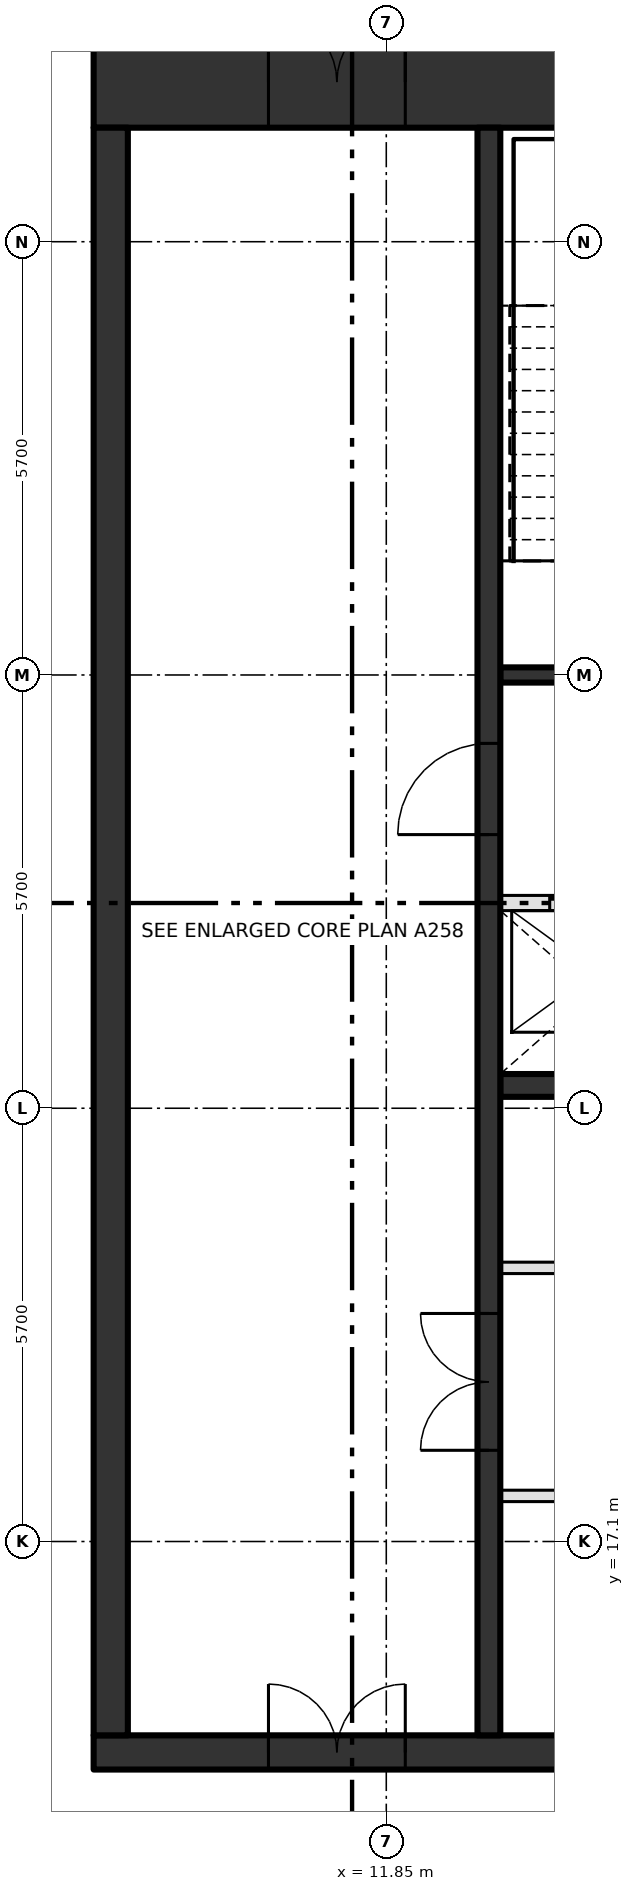
"""IFC4 building model, lengths in metres.
Left out: names, types, materials, properties, quantities, classifications, styles, units other than length and angle.
Written with IfcOpenShell. Run it as: python <this file> out.ifc"""

import sys

from ifc_helpers import new_model, si_unit, direction, frame, frame_2d, origin, place, context, subcontext, project, spatial, rectangle, extrude, element, fill, save


model = new_model("IFC4")
c1 = context("Model", 3, precision=1e-05, world=origin(), true_north=direction((0.0, 1.0)))
c2 = subcontext(c1, "Body", "Model", "MODEL_VIEW")
j1 = project(units=[si_unit("LENGTHUNIT", "METRE"), si_unit("PLANEANGLEUNIT", "RADIAN")], contexts=[c1])
p1 = place(None, origin())
s1 = spatial("IfcSite", under=j1, at=p1, CompositionType="ELEMENT")
p2 = place(p1, origin())
s2 = spatial("IfcBuilding", under=s1, at=p2, CompositionType="ELEMENT")
p3 = place(p2, frame((0.0, 0.0, 419.4)))
s3 = spatial("IfcBuildingStorey", under=s2, at=p3, CompositionType="ELEMENT", Elevation=419.4)
p4 = place(p3, frame((8.0, 14.325, -0.45), z_axis=(0.0, 0.0, 1.0), x_axis=(1.0, 0.0, 0.0)))
e1 = element("IfcWall", 1, at=p4, inside=s3, PredefinedType="SHEAR", context=c2, shape_type="SweptSolid", body=[
    extrude(rectangle(XDim=22.8, YDim=0.45, at=frame_2d((11.4, 0.0))), origin(), (0.0, 0.0, 1.0), 4.95),
])
p5 = place(p4, frame((2.3, 0.0, 0.45)))
e2 = element("IfcOpeningElement", 2, at=p5, cuts=e1, PredefinedType="OPENING", context=c2, shape_type="SweptSolid", body=[
    extrude(rectangle(XDim=1.8, YDim=2.1, at=frame_2d((0.9, 1.05))), frame((0.0, 0.235, 0.0), z_axis=(0.0, -1.0, 0.0), x_axis=(1.0, 0.0, 0.0)), (0.0, 0.0, 1.0), 0.47),
])
p6 = place(p3, frame((8.0, 36.3, -0.45), z_axis=(0.0, 0.0, 1.0), x_axis=(1.0, 0.0, 0.0)))
e3 = element("IfcWall", 3, at=p6, inside=s3, PredefinedType="SHEAR", context=c2, shape_type="SweptSolid", body=[
    extrude(rectangle(XDim=22.8, YDim=1.2, at=frame_2d((11.4, 0.0))), origin(), (0.0, 0.0, 1.0), 4.95),
])
p7 = place(p6, frame((2.3, 0.0, 0.45)))
e4 = element("IfcOpeningElement", 4, at=p7, cuts=e3, PredefinedType="OPENING", context=c2, shape_type="SweptSolid", body=[
    extrude(rectangle(XDim=1.8, YDim=2.1, at=frame_2d((0.9, 1.05))), frame((0.0, 0.61, 0.0), z_axis=(0.0, -1.0, 0.0), x_axis=(1.0, 0.0, 0.0)), (0.0, 0.0, 1.0), 1.22),
])
p8 = place(p3, frame((8.225, 14.55, -0.45), z_axis=(0.0, 0.0, 1.0), x_axis=(0.0, 1.0, 0.0)))
e5 = element("IfcWall", 5, at=p8, inside=s3, PredefinedType="SHEAR", context=c2, shape_type="SweptSolid", body=[
    extrude(rectangle(XDim=21.15, YDim=0.45, at=frame_2d((10.575, 0.0))), origin(), (0.0, 0.0, 1.0), 4.95),
])
p9 = place(p3, frame((13.35, 17.7, 0.0), z_axis=(0.0, 0.0, 1.0), x_axis=(1.0, 0.0, 0.0)))
e6 = element("IfcWall", 6, at=p9, inside=s3, PredefinedType="PARTITIONING", context=c2, shape_type="SweptSolid", body=[
    extrude(rectangle(XDim=13.425, YDim=0.15, at=frame_2d((6.712, 0.0))), origin(), (0.0, 0.0, 1.0), 4.5),
])
p10 = place(p9, frame((3.45, 0.0, 0.0)))
e7 = element("IfcOpeningElement", 7, at=p10, cuts=e6, PredefinedType="OPENING", context=c2, shape_type="SweptSolid", body=[
    extrude(rectangle(XDim=0.9, YDim=2.1, at=frame_2d((0.45, 1.05))), frame((0.0, 0.085, 0.0), z_axis=(0.0, -1.0, 0.0), x_axis=(1.0, 0.0, 0.0)), (0.0, 0.0, 1.0), 0.17),
])
p11 = place(p9, frame((10.2, 0.0, 0.0)))
e8 = element("IfcOpeningElement", 8, at=p11, cuts=e6, PredefinedType="OPENING", context=c2, shape_type="SweptSolid", body=[
    extrude(rectangle(XDim=0.9, YDim=2.1, at=frame_2d((0.45, 1.05))), frame((0.0, 0.085, 0.0), z_axis=(0.0, -1.0, 0.0), x_axis=(1.0, 0.0, 0.0)), (0.0, 0.0, 1.0), 0.17),
])
p12 = place(p3, frame((13.35, 20.7, 0.0), z_axis=(0.0, 0.0, 1.0), x_axis=(1.0, 0.0, 0.0)))
e9 = element("IfcWall", 9, at=p12, inside=s3, PredefinedType="PARTITIONING", context=c2, shape_type="SweptSolid", body=[
    extrude(rectangle(XDim=13.425, YDim=0.15, at=frame_2d((6.712, 0.0))), origin(), (0.0, 0.0, 1.0), 4.5),
])
p13 = place(p12, frame((0.75, 0.0, 0.0)))
e10 = element("IfcOpeningElement", 10, at=p13, cuts=e9, PredefinedType="OPENING", context=c2, shape_type="SweptSolid", body=[
    extrude(rectangle(XDim=0.9, YDim=2.1, at=frame_2d((0.45, 1.05))), frame((0.0, 0.085, 0.0), z_axis=(0.0, -1.0, 0.0), x_axis=(1.0, 0.0, 0.0)), (0.0, 0.0, 1.0), 0.17),
])
p14 = place(p12, frame((7.5, 0.0, 0.0)))
e11 = element("IfcOpeningElement", 11, at=p14, cuts=e9, PredefinedType="OPENING", context=c2, shape_type="SweptSolid", body=[
    extrude(rectangle(XDim=0.9, YDim=2.1, at=frame_2d((0.45, 1.05))), frame((0.0, 0.085, 0.0), z_axis=(0.0, -1.0, 0.0), x_axis=(1.0, 0.0, 0.0)), (0.0, 0.0, 1.0), 0.17),
])
p15 = place(p3, frame((13.35, 23.1, 0.0), z_axis=(0.0, 0.0, 1.0), x_axis=(1.0, 0.0, 0.0)))
e12 = element("IfcWall", 12, at=p15, inside=s3, PredefinedType="SHEAR", context=c2, shape_type="SweptSolid", body=[
    extrude(rectangle(XDim=17.0, YDim=0.3, at=frame_2d((8.5, 0.0))), origin(), (0.0, 0.0, 1.0), 4.5),
])
p16 = place(p3, frame((13.35, 25.5, 0.0), z_axis=(0.0, 0.0, 1.0), x_axis=(1.0, 0.0, 0.0)))
e13 = element("IfcWall", 13, at=p16, inside=s3, PredefinedType="SOLIDWALL", context=c2, shape_type="SweptSolid", body=[
    extrude(rectangle(XDim=17.0, YDim=0.2, at=frame_2d((8.5, 0.0))), origin(), (0.0, 0.0, 1.0), 4.5),
])
p17 = place(p16, frame((0.65, 0.0, 0.0)))
e14 = element("IfcOpeningElement", 14, at=p17, cuts=e13, PredefinedType="OPENING", context=c2, shape_type="SweptSolid", body=[
    extrude(rectangle(XDim=1.1, YDim=2.1, at=frame_2d((0.55, 1.05))), frame((0.0, 0.11, 0.0), z_axis=(0.0, -1.0, 0.0), x_axis=(1.0, 0.0, 0.0)), (0.0, 0.0, 1.0), 0.22),
])
p18 = place(p16, frame((3.35, 0.0, 0.0)))
e15 = element("IfcOpeningElement", 15, at=p18, cuts=e13, PredefinedType="OPENING", context=c2, shape_type="SweptSolid", body=[
    extrude(rectangle(XDim=1.1, YDim=2.1, at=frame_2d((0.55, 1.05))), frame((0.0, 0.11, 0.0), z_axis=(0.0, -1.0, 0.0), x_axis=(1.0, 0.0, 0.0)), (0.0, 0.0, 1.0), 0.22),
])
p19 = place(p16, frame((6.05, 0.0, 0.0)))
e16 = element("IfcOpeningElement", 16, at=p19, cuts=e13, PredefinedType="OPENING", context=c2, shape_type="SweptSolid", body=[
    extrude(rectangle(XDim=1.1, YDim=2.1, at=frame_2d((0.55, 1.05))), frame((0.0, 0.11, 0.0), z_axis=(0.0, -1.0, 0.0), x_axis=(1.0, 0.0, 0.0)), (0.0, 0.0, 1.0), 0.22),
])
p20 = place(p16, frame((8.75, 0.0, 0.0)))
e17 = element("IfcOpeningElement", 17, at=p20, cuts=e13, PredefinedType="OPENING", context=c2, shape_type="SweptSolid", body=[
    extrude(rectangle(XDim=1.1, YDim=2.1, at=frame_2d((0.55, 1.05))), frame((0.0, 0.11, 0.0), z_axis=(0.0, -1.0, 0.0), x_axis=(1.0, 0.0, 0.0)), (0.0, 0.0, 1.0), 0.22),
])
p21 = place(p16, frame((13.0, 0.0, 0.0)))
e18 = element("IfcOpeningElement", 18, at=p21, cuts=e13, PredefinedType="OPENING", context=c2, shape_type="SweptSolid", body=[
    extrude(rectangle(XDim=0.9, YDim=2.1, at=frame_2d((0.45, 1.05))), frame((0.0, 0.11, 0.0), z_axis=(0.0, -1.0, 0.0), x_axis=(1.0, 0.0, 0.0)), (0.0, 0.0, 1.0), 0.22),
])
p22 = place(p3, frame((13.35, 28.5, 0.0), z_axis=(0.0, 0.0, 1.0), x_axis=(1.0, 0.0, 0.0)))
e19 = element("IfcWall", 19, at=p22, inside=s3, PredefinedType="SOLIDWALL", context=c2, shape_type="SweptSolid", body=[
    extrude(rectangle(XDim=6.75, YDim=0.2, at=frame_2d((3.375, 0.0))), origin(), (0.0, 0.0, 1.0), 4.5),
])
p23 = place(p22, frame((0.95, 0.0, 0.0)))
e20 = element("IfcOpeningElement", 20, at=p23, cuts=e19, PredefinedType="OPENING", context=c2, shape_type="SweptSolid", body=[
    extrude(rectangle(XDim=1.2, YDim=2.1, at=frame_2d((0.6, 1.05))), frame((0.0, 0.11, 0.0), z_axis=(0.0, -1.0, 0.0), x_axis=(1.0, 0.0, 0.0)), (0.0, 0.0, 1.0), 0.22),
])
p24 = place(p22, frame((3.75, 0.0, 0.0)))
e21 = element("IfcOpeningElement", 21, at=p24, cuts=e19, PredefinedType="OPENING", context=c2, shape_type="SweptSolid", body=[
    extrude(rectangle(XDim=1.1, YDim=2.1, at=frame_2d((0.55, 1.05))), frame((0.0, 0.11, 0.0), z_axis=(0.0, -1.0, 0.0), x_axis=(1.0, 0.0, 0.0)), (0.0, 0.0, 1.0), 0.22),
])
p25 = place(p3, frame((13.2, 14.55, 0.0), z_axis=(0.0, 0.0, 1.0), x_axis=(0.0, 1.0, 0.0)))
e22 = element("IfcWall", 22, at=p25, inside=s3, PredefinedType="SHEAR", context=c2, shape_type="SweptSolid", body=[
    extrude(rectangle(XDim=21.15, YDim=0.3, at=frame_2d((10.575, 0.0))), origin(), (0.0, 0.0, 1.0), 4.5),
])
p26 = place(p25, frame((3.75, 0.0, 0.0)))
e23 = element("IfcOpeningElement", 23, at=p26, cuts=e22, PredefinedType="OPENING", context=c2, shape_type="SweptSolid", body=[
    extrude(rectangle(XDim=1.8, YDim=2.1, at=frame_2d((0.9, 1.05))), frame((0.0, 0.16, 0.0), z_axis=(0.0, -1.0, 0.0), x_axis=(1.0, 0.0, 0.0)), (0.0, 0.0, 1.0), 0.32),
])
p27 = place(p25, frame((11.85, 0.0, 0.0)))
e24 = element("IfcOpeningElement", 24, at=p27, cuts=e22, PredefinedType="OPENING", context=c2, shape_type="SweptSolid", body=[
    extrude(rectangle(XDim=1.2, YDim=2.1, at=frame_2d((0.6, 1.05))), frame((0.0, 0.16, 0.0), z_axis=(0.0, -1.0, 0.0), x_axis=(1.0, 0.0, 0.0)), (0.0, 0.0, 1.0), 0.32),
])
p28 = place(p17, origin())
e25 = element("IfcDoor", 25, at=p28, inside=s3, OperationType="SLIDING_TO_LEFT", PredefinedType="DOOR", context=c2, shape_type="SweptSolid", body=[
    extrude(rectangle(XDim=1.1, YDim=2.1, at=frame_2d((0.55, 1.05))), frame((0.0, 0.025, 0.0), z_axis=(0.0, -1.0, 0.0), x_axis=(1.0, 0.0, 0.0)), (0.0, 0.0, 1.0), 0.05),
])
fill(e14, e25)
p29 = place(p26, origin())
e26 = element("IfcDoor", 26, at=p29, inside=s3, OperationType="DOUBLE_DOOR_SINGLE_SWING", PredefinedType="DOOR", context=c2, shape_type="SweptSolid", body=[
    extrude(rectangle(XDim=1.8, YDim=2.1, at=frame_2d((0.9, 1.05))), frame((0.0, 0.025, 0.0), z_axis=(0.0, -1.0, 0.0), x_axis=(1.0, 0.0, 0.0)), (0.0, 0.0, 1.0), 0.05),
])
fill(e23, e26)
p30 = place(p27, origin())
e27 = element("IfcDoor", 27, at=p30, inside=s3, OperationType="SINGLE_SWING_LEFT", PredefinedType="DOOR", context=c2, shape_type="SweptSolid", body=[
    extrude(rectangle(XDim=1.2, YDim=2.1, at=frame_2d((0.6, 1.05))), frame((0.0, 0.025, 0.0), z_axis=(0.0, -1.0, 0.0), x_axis=(1.0, 0.0, 0.0)), (0.0, 0.0, 1.0), 0.05),
])
fill(e24, e27)
p31 = place(p7, origin())
e28 = element("IfcDoor", 28, at=p31, inside=s3, OperationType="DOUBLE_DOOR_SINGLE_SWING", PredefinedType="DOOR", context=c2, shape_type="SweptSolid", body=[
    extrude(rectangle(XDim=1.8, YDim=2.1, at=frame_2d((0.9, 1.05))), frame((0.0, 0.025, 0.0), z_axis=(0.0, -1.0, 0.0), x_axis=(1.0, 0.0, 0.0)), (0.0, 0.0, 1.0), 0.05),
])
fill(e4, e28)
p32 = place(p5, origin())
e29 = element("IfcDoor", 29, at=p32, inside=s3, OperationType="DOUBLE_DOOR_SINGLE_SWING", PredefinedType="DOOR", context=c2, shape_type="SweptSolid", body=[
    extrude(rectangle(XDim=1.8, YDim=2.1, at=frame_2d((0.9, 1.05))), frame((0.0, 0.025, 0.0), z_axis=(0.0, -1.0, 0.0), x_axis=(1.0, 0.0, 0.0)), (0.0, 0.0, 1.0), 0.05),
])
fill(e2, e29)
save(model, sys.argv[1])
